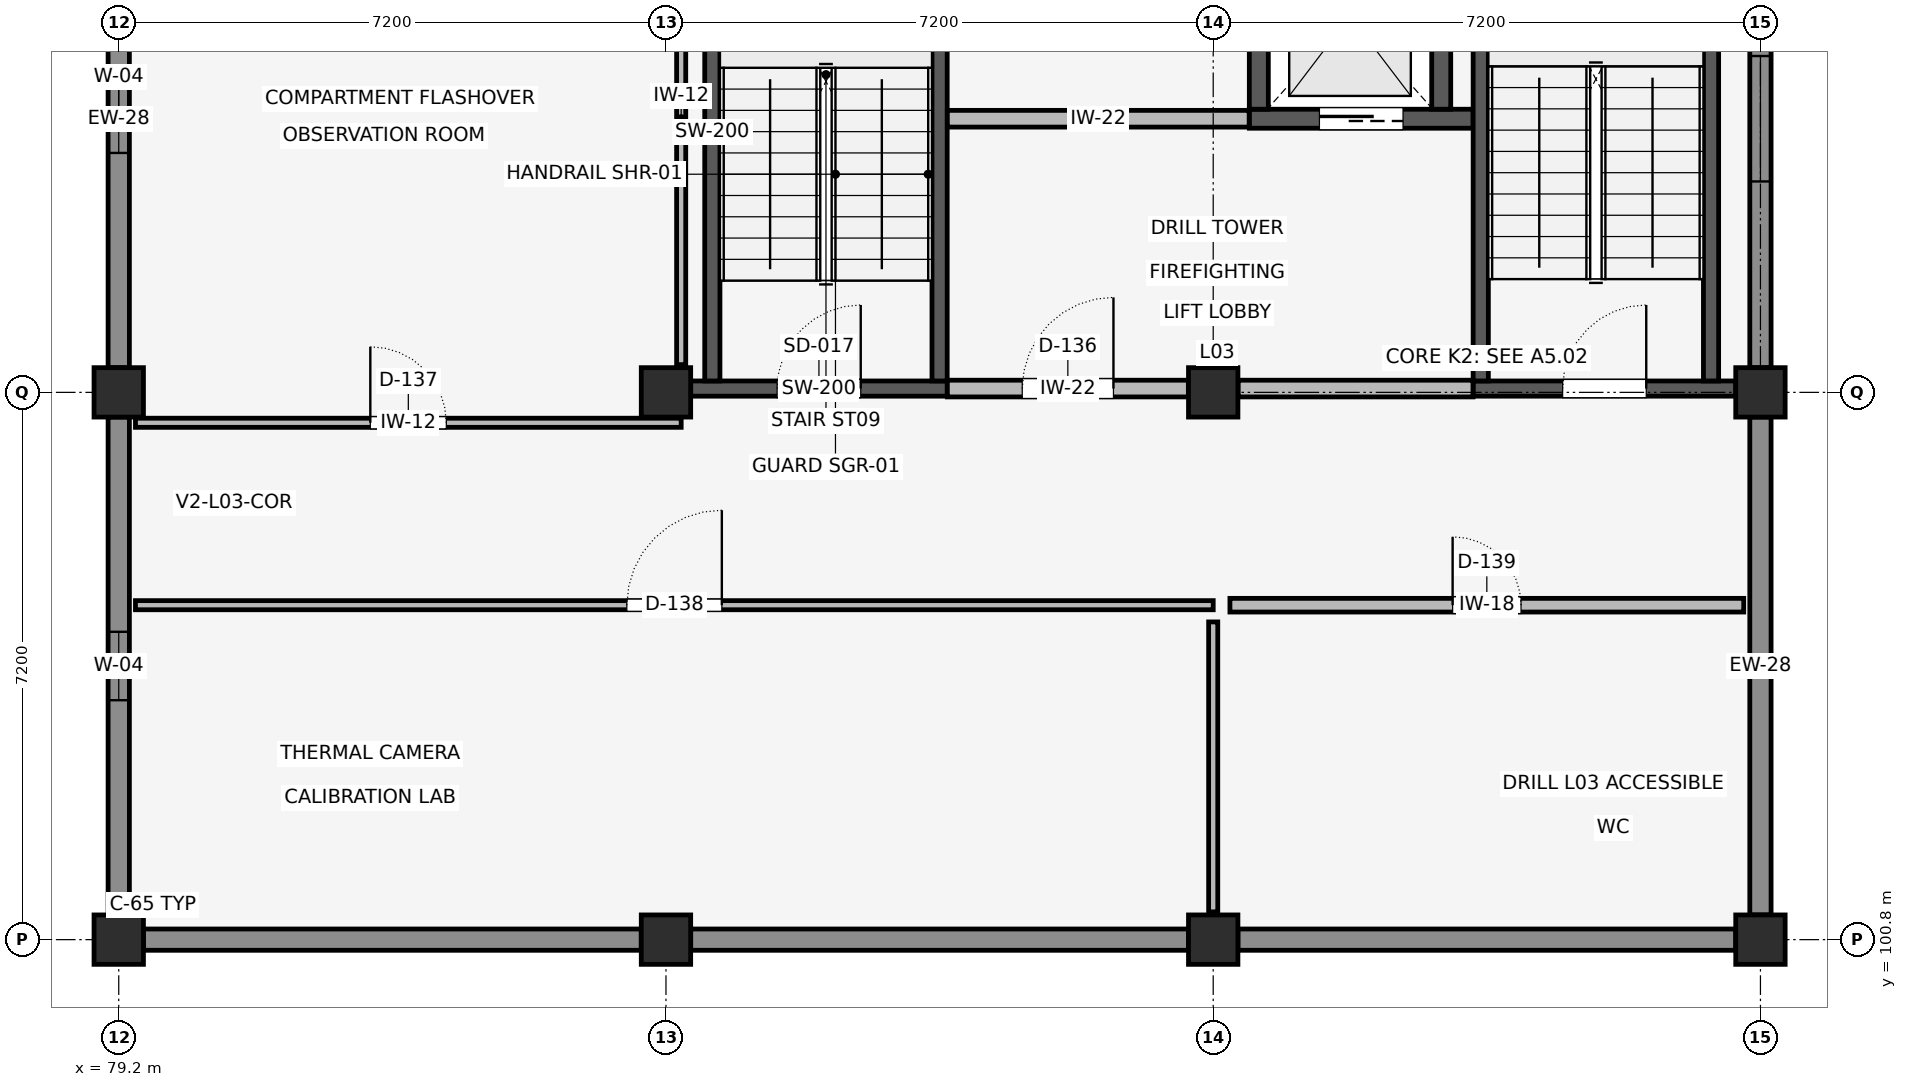
"""IFC4 building model, lengths in metres.
Left out: names, types, materials, properties, quantities, classifications, styles, units other than length and angle.
Written with IfcOpenShell. Run it as: python <this file> out.ifc"""

import sys

from ifc_helpers import new_model, si_unit, direction, frame, frame_2d, origin, origin_2d, place, context, subcontext, project, spatial, rectangle, extrude, element, fill, save


model = new_model("IFC4")
c1 = context("Model", 3, precision=1e-05, world=origin(), true_north=direction((0.0, 1.0)))
c2 = subcontext(c1, "Body", "Model", "MODEL_VIEW")
j1 = project(units=[si_unit("LENGTHUNIT", "METRE"), si_unit("PLANEANGLEUNIT", "RADIAN")], contexts=[c1])
p1 = place(None, origin())
s1 = spatial("IfcSite", under=j1, at=p1, CompositionType="ELEMENT")
p2 = place(p1, origin())
s2 = spatial("IfcBuilding", under=s1, at=p2, CompositionType="ELEMENT")
p3 = place(p2, frame((0.0, 0.0, 13.5)))
s3 = spatial("IfcBuildingStorey", under=s2, at=p3, CompositionType="ELEMENT", Elevation=13.5)
for number, where, z_axis, x_axis in (
    (1, (79.2, 100.8, 0.0), (0.0, 0.0, 1.0), (1.0, 0.0, 0.0)),
    (2, (79.2, 108.0, 0.0), (0.0, 0.0, 1.0), (1.0, 0.0, 0.0)),
    (3, (86.4, 100.8, 0.0), (0.0, 0.0, 1.0), (1.0, 0.0, 0.0)),
    (4, (86.4, 108.0, 0.0), (0.0, 0.0, 1.0), (1.0, 0.0, 0.0)),
    (5, (93.6, 100.8, 0.0), (0.0, 0.0, 1.0), (1.0, 0.0, 0.0)),
    (6, (93.6, 108.0, 0.0), (0.0, 0.0, 1.0), (1.0, 0.0, 0.0)),
    (7, (100.8, 100.8, 0.0), (0.0, 0.0, 1.0), (1.0, 0.0, 0.0)),
    (8, (100.8, 108.0, 0.0), (0.0, 0.0, 1.0), (1.0, 0.0, 0.0)),
):
    element("IfcColumn", number, at=place(p3, frame(where, z_axis=z_axis, x_axis=x_axis)), inside=s3, PredefinedType="COLUMN", context=c2, shape_type="SweptSolid", body=[
        extrude(rectangle(XDim=0.65, YDim=0.65, at=origin_2d()), origin(), (0.0, 0.0, 1.0), 3.9),
    ])
p4 = place(p3, frame((94.075, 111.6, 0.0), z_axis=(0.0, 0.0, 1.0), x_axis=(1.0, 0.0, 0.0)))
e9 = element("IfcWall", 9, at=p4, inside=s3, PredefinedType="SHEAR", context=c2, shape_type="SweptSolid", body=[
    extrude(rectangle(XDim=2.945, YDim=0.25, at=frame_2d((1.473, 0.0))), origin(), (0.0, 0.0, 1.0), 3.65),
])
p5 = place(p4, frame((0.923, 0.0, 0.0)))
e10 = element("IfcOpeningElement", 10, at=p5, cuts=e9, PredefinedType="OPENING", context=c2, shape_type="SweptSolid", body=[
    extrude(rectangle(XDim=1.1, YDim=2.15, at=frame_2d((0.55, 1.075))), frame((0.0, 0.137, 0.0), z_axis=(0.0, -1.0, 0.0), x_axis=(1.0, 0.0, 0.0)), (0.0, 0.0, 1.0), 0.274),
])
for number, where, z_axis, x_axis in (
    (11, (94.2, 111.725, 0.0), (0.0, 0.0, 1.0), (0.0, 1.0, 0.0)),
    (12, (96.6, 111.725, 0.0), (0.0, 0.0, 1.0), (0.0, 1.0, 0.0)),
):
    element("IfcWall", number, at=place(p3, frame(where, z_axis=z_axis, x_axis=x_axis)), inside=s3, PredefinedType="SHEAR", context=c2, shape_type="SweptSolid", body=[
        extrude(rectangle(XDim=2.45, YDim=0.25, at=frame_2d((1.225, 0.0))), origin(), (0.0, 0.0, 1.0), 3.65),
    ])
p6 = place(p3, frame((97.02, 108.05, 0.0), z_axis=(0.0, 0.0, 1.0), x_axis=(1.0, 0.0, 0.0)))
e13 = element("IfcWall", 13, at=p6, inside=s3, PredefinedType="SHEAR", context=c2, shape_type="SweptSolid", body=[
    extrude(rectangle(XDim=3.455, YDim=0.2, at=frame_2d((1.728, 0.0))), origin(), (0.0, 0.0, 1.0), 3.65),
])
p7 = place(p6, frame((1.177, 0.0, 0.0)))
e14 = element("IfcOpeningElement", 14, at=p7, cuts=e13, PredefinedType="OPENING", context=c2, shape_type="SweptSolid", body=[
    extrude(rectangle(XDim=1.1, YDim=2.15, at=frame_2d((0.55, 1.075))), frame((0.0, 0.112, 0.0), z_axis=(0.0, -1.0, 0.0), x_axis=(1.0, 0.0, 0.0)), (0.0, 0.0, 1.0), 0.224),
])
for number, where, z_axis, x_axis in (
    (15, (97.12, 108.15, 0.0), (0.0, 0.0, 1.0), (0.0, 1.0, 0.0)),
    (16, (100.15, 108.15, 0.0), (0.0, 0.0, 1.0), (0.0, 1.0, 0.0)),
):
    element("IfcWall", number, at=place(p3, frame(where, z_axis=z_axis, x_axis=x_axis)), inside=s3, PredefinedType="SHEAR", context=c2, shape_type="SweptSolid", body=[
        extrude(rectangle(XDim=6.6, YDim=0.2, at=frame_2d((3.3, 0.0))), origin(), (0.0, 0.0, 1.0), 3.65),
    ])
p8 = place(p3, frame((86.725, 108.05, 0.0), z_axis=(0.0, 0.0, 1.0), x_axis=(1.0, 0.0, 0.0)))
e17 = element("IfcWall", 17, at=p8, inside=s3, PredefinedType="SHEAR", context=c2, shape_type="SweptSolid", body=[
    extrude(rectangle(XDim=3.375, YDim=0.2, at=frame_2d((1.688, 0.0))), origin(), (0.0, 0.0, 1.0), 3.65),
])
p9 = place(p8, frame((1.137, 0.0, 0.0)))
e18 = element("IfcOpeningElement", 18, at=p9, cuts=e17, PredefinedType="OPENING", context=c2, shape_type="SweptSolid", body=[
    extrude(rectangle(XDim=1.1, YDim=2.15, at=frame_2d((0.55, 1.075))), frame((0.0, 0.112, 0.0), z_axis=(0.0, -1.0, 0.0), x_axis=(1.0, 0.0, 0.0)), (0.0, 0.0, 1.0), 0.224),
])
for number, where, z_axis, x_axis in (
    (19, (87.01, 108.15, 0.0), (0.0, 0.0, 1.0), (0.0, 1.0, 0.0)),
    (20, (90.0, 108.15, 0.0), (0.0, 0.0, 1.0), (0.0, 1.0, 0.0)),
):
    element("IfcWall", number, at=place(p3, frame(where, z_axis=z_axis, x_axis=x_axis)), inside=s3, PredefinedType="SHEAR", context=c2, shape_type="SweptSolid", body=[
        extrude(rectangle(XDim=6.56, YDim=0.2, at=frame_2d((3.28, 0.0))), origin(), (0.0, 0.0, 1.0), 3.65),
    ])
p10 = place(p3, frame((100.8, 101.125, 0.0), z_axis=(0.0, 0.0, 1.0), x_axis=(0.0, 1.0, 0.0)))
e21 = element("IfcWall", 21, at=p10, inside=s3, PredefinedType="ELEMENTEDWALL", context=c2, shape_type="SweptSolid", body=[
    extrude(rectangle(XDim=6.55, YDim=0.28, at=frame_2d((3.275, 0.0))), origin(), (0.0, 0.0, 1.0), 3.04),
])
p11 = place(p3, frame((100.8, 108.325, 0.0), z_axis=(0.0, 0.0, 1.0), x_axis=(0.0, 1.0, 0.0)))
e22 = element("IfcWall", 22, at=p11, inside=s3, PredefinedType="ELEMENTEDWALL", context=c2, shape_type="SweptSolid", body=[
    extrude(rectangle(XDim=6.55, YDim=0.28, at=frame_2d((3.275, 0.0))), origin(), (0.0, 0.0, 1.0), 2.99),
])
p12 = place(p11, frame((2.45, 0.0, 0.85)))
e23 = element("IfcOpeningElement", 23, at=p12, cuts=e22, PredefinedType="OPENING", context=c2, shape_type="SweptSolid", body=[
    extrude(rectangle(XDim=1.65, YDim=1.9, at=frame_2d((0.825, 0.95))), frame((0.0, 0.152, 0.0), z_axis=(0.0, -1.0, 0.0), x_axis=(1.0, 0.0, 0.0)), (0.0, 0.0, 1.0), 0.304),
])
p13 = place(p3, frame((79.2, 114.875, 0.0), z_axis=(0.0, 0.0, 1.0), x_axis=(0.0, -1.0, 0.0)))
e24 = element("IfcWall", 24, at=p13, inside=s3, PredefinedType="ELEMENTEDWALL", context=c2, shape_type="SweptSolid", body=[
    extrude(rectangle(XDim=6.55, YDim=0.28, at=frame_2d((3.275, 0.0))), origin(), (0.0, 0.0, 1.0), 2.99),
])
p14 = place(p13, frame((2.825, 0.0, 0.8)))
e25 = element("IfcOpeningElement", 25, at=p14, cuts=e24, PredefinedType="OPENING", context=c2, shape_type="SweptSolid", body=[
    extrude(rectangle(XDim=0.9, YDim=2.0, at=frame_2d((0.45, 1.0))), frame((0.0, 0.152, 0.0), z_axis=(0.0, -1.0, 0.0), x_axis=(1.0, 0.0, 0.0)), (0.0, 0.0, 1.0), 0.304),
])
p15 = place(p3, frame((79.2, 107.675, 0.0), z_axis=(0.0, 0.0, 1.0), x_axis=(0.0, -1.0, 0.0)))
e26 = element("IfcWall", 26, at=p15, inside=s3, PredefinedType="ELEMENTEDWALL", context=c2, shape_type="SweptSolid", body=[
    extrude(rectangle(XDim=6.55, YDim=0.28, at=frame_2d((3.275, 0.0))), origin(), (0.0, 0.0, 1.0), 3.04),
])
p16 = place(p15, frame((2.825, 0.0, 0.85)))
e27 = element("IfcOpeningElement", 27, at=p16, cuts=e26, PredefinedType="OPENING", context=c2, shape_type="SweptSolid", body=[
    extrude(rectangle(XDim=0.9, YDim=2.0, at=frame_2d((0.45, 1.0))), frame((0.0, 0.152, 0.0), z_axis=(0.0, -1.0, 0.0), x_axis=(1.0, 0.0, 0.0)), (0.0, 0.0, 1.0), 0.304),
])
p17 = place(p3, frame((79.525, 100.8, 0.0), z_axis=(0.0, 0.0, 1.0), x_axis=(1.0, 0.0, 0.0)))
e28 = element("IfcWall", 28, at=p17, inside=s3, PredefinedType="ELEMENTEDWALL", context=c2, shape_type="SweptSolid", body=[
    extrude(rectangle(XDim=6.55, YDim=0.28, at=frame_2d((3.275, 0.0))), origin(), (0.0, 0.0, 1.0), 2.89),
])
p18 = place(p3, frame((86.725, 100.8, 0.0), z_axis=(0.0, 0.0, 1.0), x_axis=(1.0, 0.0, 0.0)))
e29 = element("IfcWall", 29, at=p18, inside=s3, PredefinedType="ELEMENTEDWALL", context=c2, shape_type="SweptSolid", body=[
    extrude(rectangle(XDim=6.55, YDim=0.28, at=frame_2d((3.275, 0.0))), origin(), (0.0, 0.0, 1.0), 2.94),
])
p19 = place(p3, frame((93.925, 100.8, 0.0), z_axis=(0.0, 0.0, 1.0), x_axis=(1.0, 0.0, 0.0)))
e30 = element("IfcWall", 30, at=p19, inside=s3, PredefinedType="ELEMENTEDWALL", context=c2, shape_type="SweptSolid", body=[
    extrude(rectangle(XDim=6.55, YDim=0.28, at=frame_2d((3.275, 0.0))), origin(), (0.0, 0.0, 1.0), 2.89),
])
p20 = place(p3, frame((90.102, 108.05, 0.0), z_axis=(0.0, 0.0, 1.0), x_axis=(1.0, 0.0, 0.0)))
e31 = element("IfcWall", 31, at=p20, inside=s3, PredefinedType="STANDARD", context=c2, shape_type="SweptSolid", body=[
    extrude(rectangle(XDim=3.171, YDim=0.22, at=frame_2d((1.585, 0.0))), origin(), (0.0, 0.0, 1.0), 3.62),
])
p21 = place(p20, frame((0.986, 0.0, 0.0)))
e32 = element("IfcOpeningElement", 32, at=p21, cuts=e31, PredefinedType="OPENING", context=c2, shape_type="SweptSolid", body=[
    extrude(rectangle(XDim=1.2, YDim=2.2, at=frame_2d((0.6, 1.1))), frame((0.0, 0.122, 0.0), z_axis=(0.0, -1.0, 0.0), x_axis=(1.0, 0.0, 0.0)), (0.0, 0.0, 1.0), 0.244),
])
p22 = place(p3, frame((93.927, 108.05, 0.0), z_axis=(0.0, 0.0, 1.0), x_axis=(1.0, 0.0, 0.0)))
e33 = element("IfcWall", 33, at=p22, inside=s3, PredefinedType="STANDARD", context=c2, shape_type="SweptSolid", body=[
    extrude(rectangle(XDim=3.091, YDim=0.22, at=frame_2d((1.545, 0.0))), origin(), (0.0, 0.0, 1.0), 3.62),
])
p23 = place(p3, frame((90.102, 111.6, 0.0), z_axis=(0.0, 0.0, 1.0), x_axis=(1.0, 0.0, 0.0)))
e34 = element("IfcWall", 34, at=p23, inside=s3, PredefinedType="STANDARD", context=c2, shape_type="SweptSolid", body=[
    extrude(rectangle(XDim=3.971, YDim=0.22, at=frame_2d((1.985, 0.0))), origin(), (0.0, 0.0, 1.0), 2.988),
])
p24 = place(p3, frame((79.42, 107.6, 0.0), z_axis=(0.0, 0.0, 1.0), x_axis=(1.0, 0.0, 0.0)))
e35 = element("IfcWall", 35, at=p24, inside=s3, PredefinedType="PARTITIONING", context=c2, shape_type="SweptSolid", body=[
    extrude(rectangle(XDim=7.18, YDim=0.12, at=frame_2d((3.59, 0.0))), origin(), (0.0, 0.0, 1.0), 3.038),
])
p25 = place(p24, frame((3.09, 0.0, 0.0)))
e36 = element("IfcOpeningElement", 36, at=p25, cuts=e35, PredefinedType="OPENING", context=c2, shape_type="SweptSolid", body=[
    extrude(rectangle(XDim=1.0, YDim=2.15, at=frame_2d((0.5, 1.075))), frame((0.0, 0.072, 0.0), z_axis=(0.0, -1.0, 0.0), x_axis=(1.0, 0.0, 0.0)), (0.0, 0.0, 1.0), 0.144),
])
p26 = place(p3, frame((86.6, 108.365, 0.0), z_axis=(0.0, 0.0, 1.0), x_axis=(0.0, 1.0, 0.0)))
e37 = element("IfcWall", 37, at=p26, inside=s3, PredefinedType="PARTITIONING", context=c2, shape_type="SweptSolid", body=[
    extrude(rectangle(XDim=6.47, YDim=0.12, at=frame_2d((3.235, 0.0))), origin(), (0.0, 0.0, 1.0), 2.988),
])
p27 = place(p3, frame((79.42, 105.2, 0.0), z_axis=(0.0, 0.0, 1.0), x_axis=(1.0, 0.0, 0.0)))
e38 = element("IfcWall", 38, at=p27, inside=s3, PredefinedType="PARTITIONING", context=c2, shape_type="SweptSolid", body=[
    extrude(rectangle(XDim=14.18, YDim=0.12, at=frame_2d((7.09, 0.0))), origin(), (0.0, 0.0, 1.0), 3.038),
])
p28 = place(p27, frame((6.465, 0.0, 0.0)))
e39 = element("IfcOpeningElement", 39, at=p28, cuts=e38, PredefinedType="OPENING", context=c2, shape_type="SweptSolid", body=[
    extrude(rectangle(XDim=1.25, YDim=2.15, at=frame_2d((0.625, 1.075))), frame((0.0, 0.072, 0.0), z_axis=(0.0, -1.0, 0.0), x_axis=(1.0, 0.0, 0.0)), (0.0, 0.0, 1.0), 0.144),
])
p29 = place(p3, frame((93.6, 101.165, 0.0), z_axis=(0.0, 0.0, 1.0), x_axis=(0.0, 1.0, 0.0)))
e40 = element("IfcWall", 40, at=p29, inside=s3, PredefinedType="PARTITIONING", context=c2, shape_type="SweptSolid", body=[
    extrude(rectangle(XDim=3.815, YDim=0.12, at=frame_2d((1.907, 0.0))), origin(), (0.0, 0.0, 1.0), 3.038),
])
p30 = place(p3, frame((93.82, 105.2, 0.0), z_axis=(0.0, 0.0, 1.0), x_axis=(1.0, 0.0, 0.0)))
e41 = element("IfcWall", 41, at=p30, inside=s3, PredefinedType="PLUMBINGWALL", context=c2, shape_type="SweptSolid", body=[
    extrude(rectangle(XDim=6.76, YDim=0.18, at=frame_2d((3.38, 0.0))), origin(), (0.0, 0.0, 1.0), 3.62),
])
p31 = place(p30, frame((2.93, 0.0, 0.0)))
e42 = element("IfcOpeningElement", 42, at=p31, cuts=e41, PredefinedType="OPENING", context=c2, shape_type="SweptSolid", body=[
    extrude(rectangle(XDim=0.9, YDim=2.1, at=frame_2d((0.45, 1.05))), frame((0.0, 0.102, 0.0), z_axis=(0.0, -1.0, 0.0), x_axis=(1.0, 0.0, 0.0)), (0.0, 0.0, 1.0), 0.204),
])
p32 = place(p12, origin())
e43 = element("IfcWindow", 43, at=p32, inside=s3, PartitioningType="SINGLE_PANEL", PredefinedType="WINDOW", context=c2, shape_type="SweptSolid", body=[
    extrude(rectangle(XDim=1.65, YDim=1.9, at=frame_2d((0.825, 0.95))), frame((0.0, 0.03, 0.0), z_axis=(0.0, -1.0, 0.0), x_axis=(1.0, 0.0, 0.0)), (0.0, 0.0, 1.0), 0.06),
])
fill(e23, e43)
p33 = place(p14, origin())
e44 = element("IfcWindow", 44, at=p33, inside=s3, PartitioningType="SINGLE_PANEL", PredefinedType="WINDOW", context=c2, shape_type="SweptSolid", body=[
    extrude(rectangle(XDim=0.9, YDim=2.0, at=frame_2d((0.45, 1.0))), frame((0.0, 0.03, 0.0), z_axis=(0.0, -1.0, 0.0), x_axis=(1.0, 0.0, 0.0)), (0.0, 0.0, 1.0), 0.06),
])
fill(e25, e44)
p34 = place(p16, origin())
e45 = element("IfcWindow", 45, at=p34, inside=s3, PartitioningType="SINGLE_PANEL", PredefinedType="WINDOW", context=c2, shape_type="SweptSolid", body=[
    extrude(rectangle(XDim=0.9, YDim=2.0, at=frame_2d((0.45, 1.0))), frame((0.0, 0.03, 0.0), z_axis=(0.0, -1.0, 0.0), x_axis=(1.0, 0.0, 0.0)), (0.0, 0.0, 1.0), 0.06),
])
fill(e27, e45)
p35 = place(p7, origin())
e46 = element("IfcDoor", 46, at=p35, inside=s3, OperationType="SINGLE_SWING_RIGHT", PredefinedType="DOOR", context=c2, shape_type="SweptSolid", body=[
    extrude(rectangle(XDim=1.1, YDim=2.15, at=frame_2d((0.55, 1.075))), frame((0.0, 0.025, 0.0), z_axis=(0.0, -1.0, 0.0), x_axis=(1.0, 0.0, 0.0)), (0.0, 0.0, 1.0), 0.05),
])
fill(e14, e46)
p36 = place(p9, origin())
e47 = element("IfcDoor", 47, at=p36, inside=s3, OperationType="SINGLE_SWING_RIGHT", PredefinedType="DOOR", context=c2, shape_type="SweptSolid", body=[
    extrude(rectangle(XDim=1.1, YDim=2.15, at=frame_2d((0.55, 1.075))), frame((0.0, 0.025, 0.0), z_axis=(0.0, -1.0, 0.0), x_axis=(1.0, 0.0, 0.0)), (0.0, 0.0, 1.0), 0.05),
])
fill(e18, e47)
p37 = place(p5, origin())
e48 = element("IfcDoor", 48, at=p37, inside=s3, OperationType="SLIDING_TO_LEFT", PredefinedType="DOOR", context=c2, shape_type="SweptSolid", body=[
    extrude(rectangle(XDim=1.1, YDim=2.15, at=frame_2d((0.55, 1.075))), frame((0.0, 0.025, 0.0), z_axis=(0.0, -1.0, 0.0), x_axis=(1.0, 0.0, 0.0)), (0.0, 0.0, 1.0), 0.05),
])
fill(e10, e48)
p38 = place(p21, origin())
e49 = element("IfcDoor", 49, at=p38, inside=s3, OperationType="SINGLE_SWING_RIGHT", PredefinedType="DOOR", context=c2, shape_type="SweptSolid", body=[
    extrude(rectangle(XDim=1.2, YDim=2.2, at=frame_2d((0.6, 1.1))), frame((0.0, 0.025, 0.0), z_axis=(0.0, -1.0, 0.0), x_axis=(1.0, 0.0, 0.0)), (0.0, 0.0, 1.0), 0.05),
])
fill(e32, e49)
p39 = place(p25, origin())
e50 = element("IfcDoor", 50, at=p39, inside=s3, OperationType="SINGLE_SWING_LEFT", PredefinedType="DOOR", context=c2, shape_type="SweptSolid", body=[
    extrude(rectangle(XDim=1.0, YDim=2.15, at=frame_2d((0.5, 1.075))), frame((0.0, 0.025, 0.0), z_axis=(0.0, -1.0, 0.0), x_axis=(1.0, 0.0, 0.0)), (0.0, 0.0, 1.0), 0.05),
])
fill(e36, e50)
p40 = place(p28, origin())
e51 = element("IfcDoor", 51, at=p40, inside=s3, OperationType="SINGLE_SWING_RIGHT", PredefinedType="DOOR", context=c2, shape_type="SweptSolid", body=[
    extrude(rectangle(XDim=1.25, YDim=2.15, at=frame_2d((0.625, 1.075))), frame((0.0, 0.025, 0.0), z_axis=(0.0, -1.0, 0.0), x_axis=(1.0, 0.0, 0.0)), (0.0, 0.0, 1.0), 0.05),
])
fill(e39, e51)
p41 = place(p31, origin())
e52 = element("IfcDoor", 52, at=p41, inside=s3, OperationType="SINGLE_SWING_LEFT", PredefinedType="DOOR", context=c2, shape_type="SweptSolid", body=[
    extrude(rectangle(XDim=0.9, YDim=2.1, at=frame_2d((0.45, 1.05))), frame((0.0, 0.025, 0.0), z_axis=(0.0, -1.0, 0.0), x_axis=(1.0, 0.0, 0.0)), (0.0, 0.0, 1.0), 0.05),
])
fill(e42, e52)
save(model, sys.argv[1])
